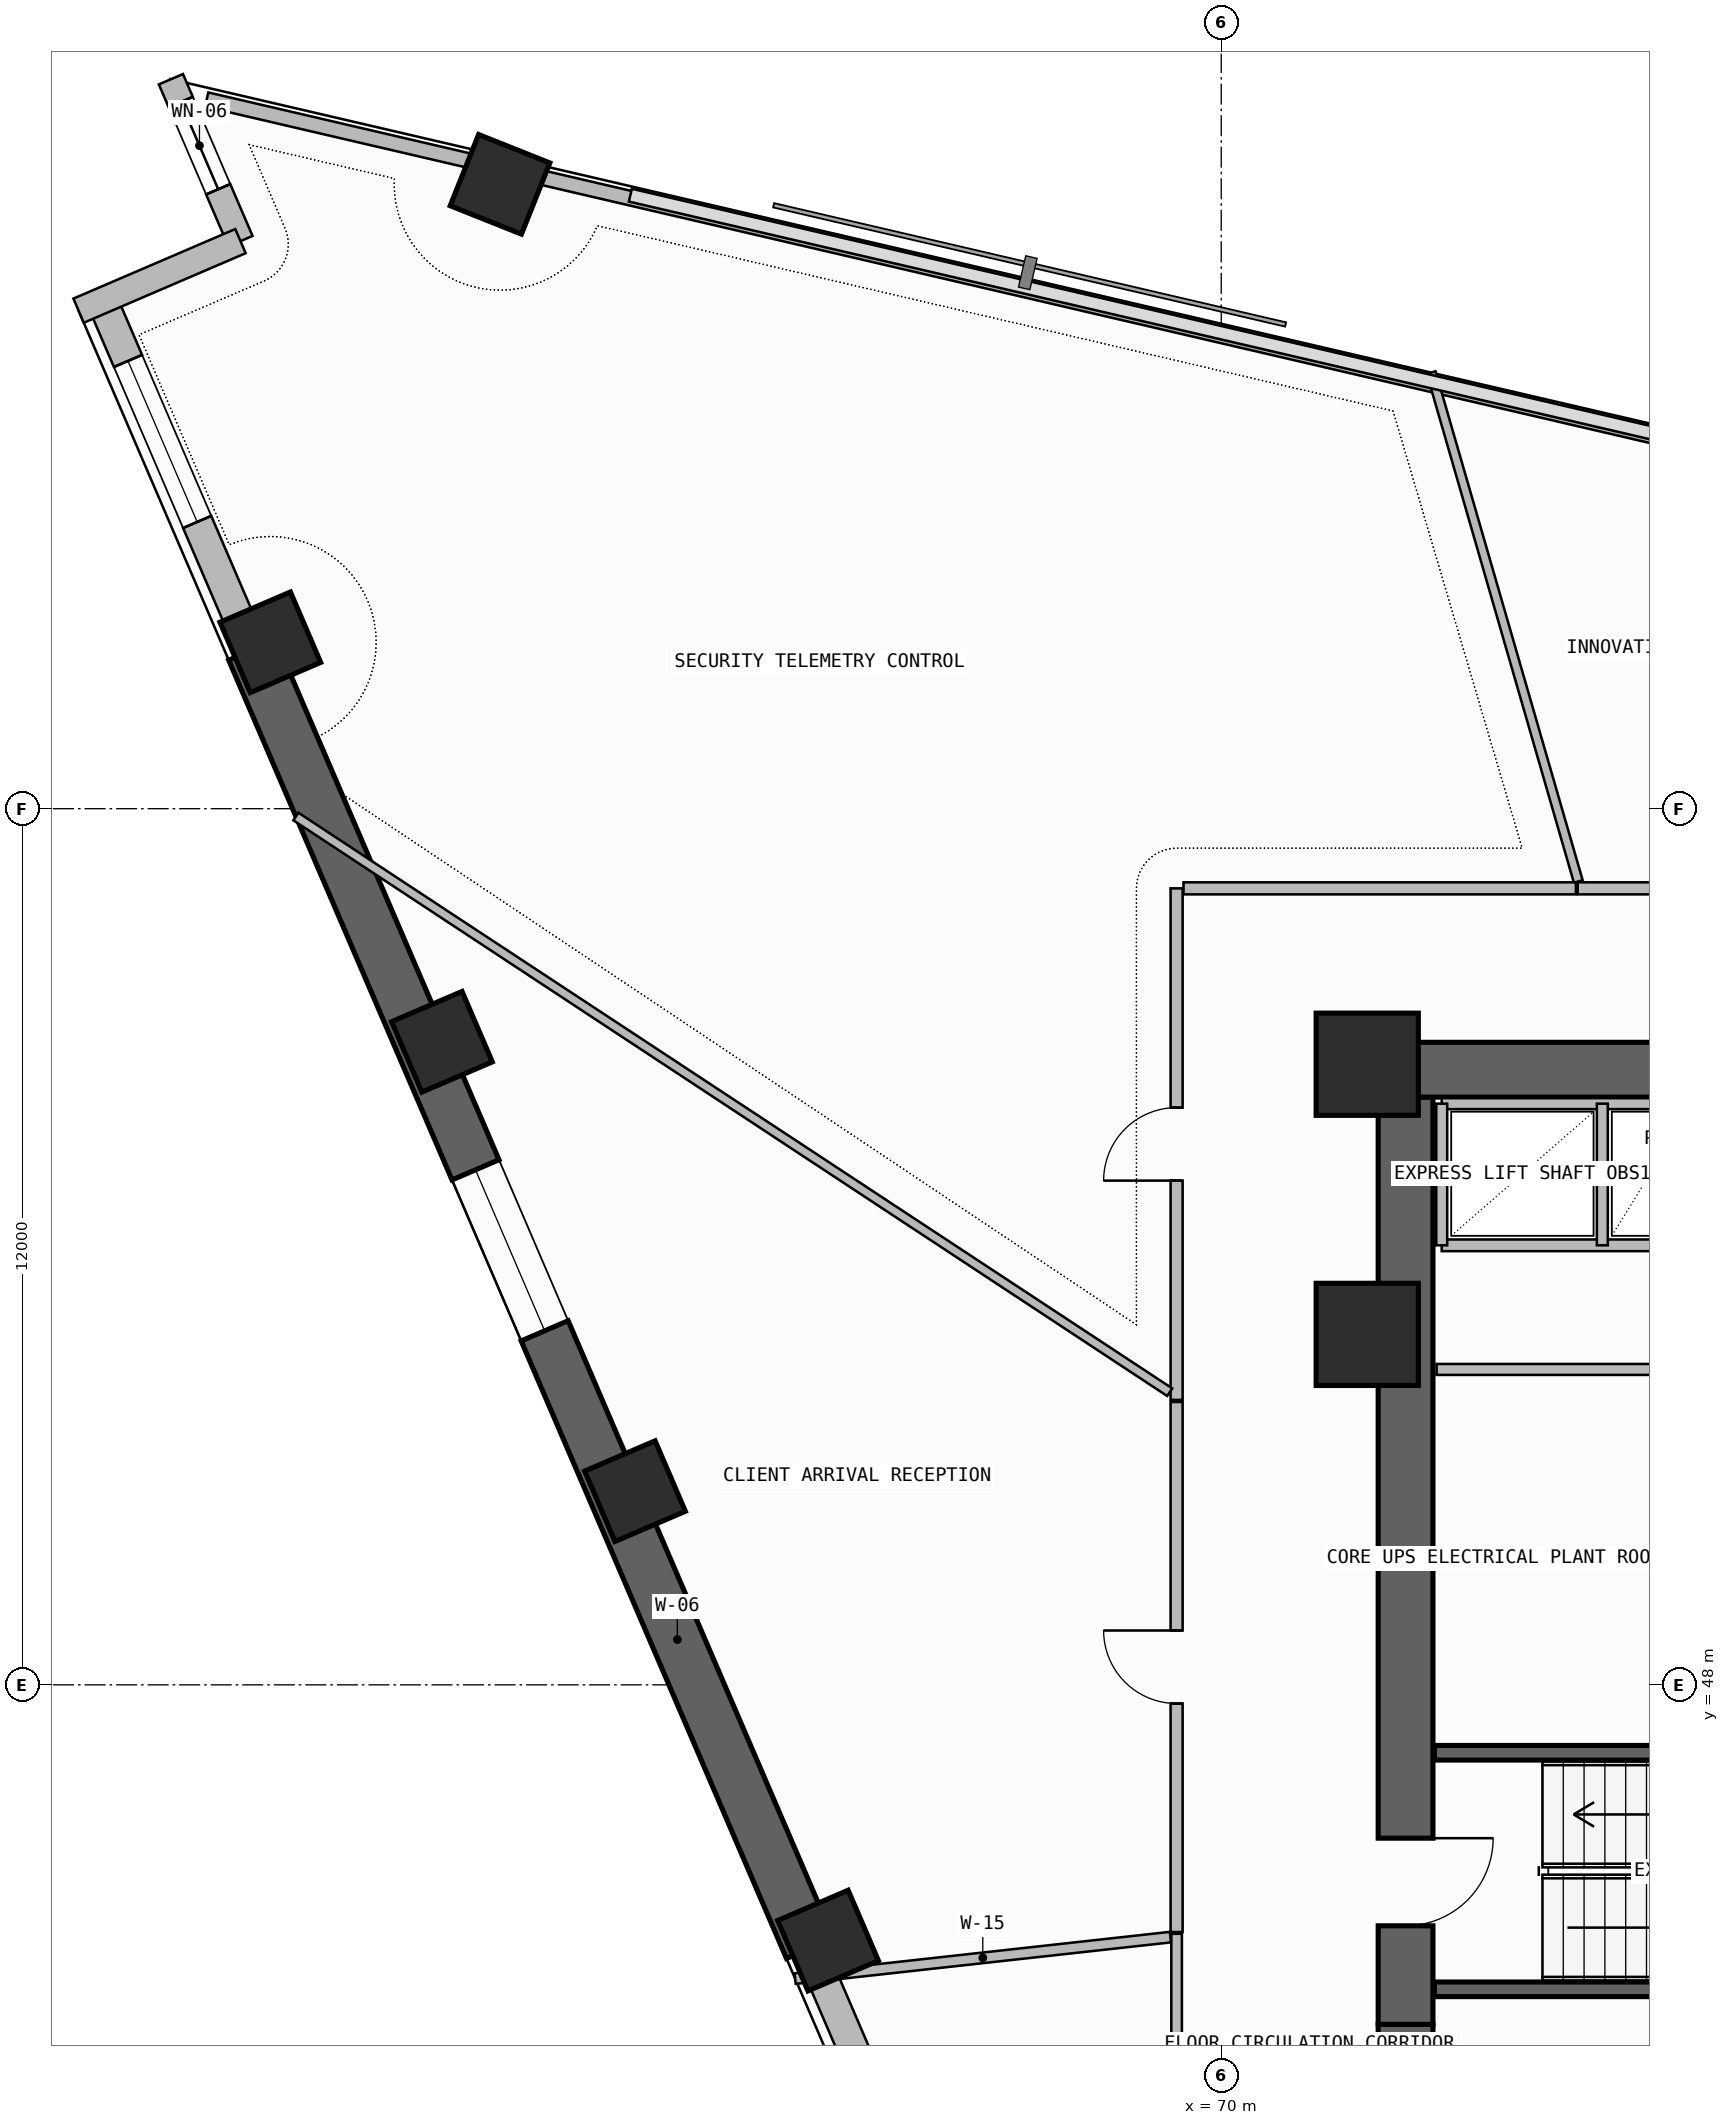
"""IFC4 building model, lengths in metres.
Left out: names, types, materials, properties, quantities, classifications, styles, units other than length and angle.
Written with IfcOpenShell. Run it as: python <this file> out.ifc"""

import sys

from ifc_helpers import new_model, si_unit, direction, frame, frame_2d, origin, origin_2d, place, context, subcontext, project, spatial, rectangle, extrude, element, fill, save


model = new_model("IFC4")
c1 = context("Model", 3, precision=1e-05, world=origin(), true_north=direction((0.0, 1.0)))
c2 = subcontext(c1, "Body", "Model", "MODEL_VIEW")
j1 = project(units=[si_unit("LENGTHUNIT", "METRE"), si_unit("PLANEANGLEUNIT", "RADIAN")], contexts=[c1])
p1 = place(None, origin())
s1 = spatial("IfcSite", under=j1, at=p1, CompositionType="ELEMENT")
p2 = place(p1, origin())
s2 = spatial("IfcBuilding", under=s1, at=p2, CompositionType="ELEMENT")
p3 = place(p2, frame((0.0, 0.0, 171.9)))
s3 = spatial("IfcBuildingStorey", under=s2, at=p3, CompositionType="ELEMENT", Elevation=171.9)
p4 = place(p3, frame((72.525, 35.5, -0.26), z_axis=(0.0, 0.0, 1.0), x_axis=(0.0, 1.0, 0.0)))
e1 = element("IfcWall", 1, at=p4, inside=s3, PredefinedType="SHEAR", context=c2, shape_type="SweptSolid", body=[
    extrude(rectangle(XDim=7.85, YDim=0.75, at=frame_2d((3.925, 0.0))), origin(), (0.0, 0.0, 1.0), 3.6),
])
p5 = place(p4, frame((1.45, 0.0, 0.26)))
e2 = element("IfcOpeningElement", 2, at=p5, cuts=e1, PredefinedType="OPENING", context=c2, shape_type="SweptSolid", body=[
    extrude(rectangle(XDim=1.2, YDim=2.2, at=frame_2d((0.6, 1.1))), frame((0.0, 0.385, 0.0), z_axis=(0.0, -1.0, 0.0), x_axis=(1.0, 0.0, 0.0)), (0.0, 0.0, 1.0), 0.77),
])
p6 = place(p3, frame((72.525, 43.35, -0.26), z_axis=(0.0, 0.0, 1.0), x_axis=(0.0, 1.0, 0.0)))
e3 = element("IfcWall", 3, at=p6, inside=s3, PredefinedType="SHEAR", context=c2, shape_type="SweptSolid", body=[
    extrude(rectangle(XDim=12.7, YDim=0.75, at=frame_2d((6.35, 0.0))), origin(), (0.0, 0.0, 1.0), 3.6),
])
p7 = place(p6, frame((1.35, 0.0, 0.26)))
e4 = element("IfcOpeningElement", 4, at=p7, cuts=e3, PredefinedType="OPENING", context=c2, shape_type="SweptSolid", body=[
    extrude(rectangle(XDim=1.2, YDim=2.2, at=frame_2d((0.6, 1.1))), frame((0.0, 0.385, 0.0), z_axis=(0.0, -1.0, 0.0), x_axis=(1.0, 0.0, 0.0)), (0.0, 0.0, 1.0), 0.77),
])
p8 = place(p3, frame((72.0, 56.425, -0.26), z_axis=(0.0, 0.0, 1.0), x_axis=(1.0, 0.0, 0.0)))
e5 = element("IfcWall", 5, at=p8, inside=s3, PredefinedType="SHEAR", context=c2, shape_type="SweptSolid", body=[
    extrude(rectangle(XDim=13.75, YDim=0.75, at=frame_2d((6.875, 0.0))), origin(), (0.0, 0.0, 1.0), 3.6),
])
for number, where, z_axis, x_axis in (
    (6, (72.0, 52.8, 0.0), (0.0, 0.0, 1.0), (1.0, 0.0, 0.0)),
    (7, (72.0, 56.5, 0.0), (0.0, 0.0, 1.0), (1.0, 0.0, 0.0)),
):
    element("IfcColumn", number, at=place(p3, frame(where, z_axis=z_axis, x_axis=x_axis)), inside=s3, PredefinedType="COLUMN", context=c2, shape_type="SweptSolid", body=[
        extrude(rectangle(XDim=1.4, YDim=1.4, at=origin_2d()), origin(), (0.0, 0.0, 1.0), 3.6),
    ])
for number, where, z_axis, x_axis in (
    (8, (60.122, 68.551, 0.0), (0.0, 0.0, 1.0), (0.371, 0.929, 0.0)),
    (9, (56.976, 62.279, 0.0), (0.0, 0.0, 1.0), (-0.395, 0.919, 0.0)),
    (10, (59.326, 56.807, 0.0), (0.0, 0.0, 1.0), (-0.395, 0.919, 0.0)),
    (11, (61.97, 50.653, 0.0), (0.0, 0.0, 1.0), (-0.395, 0.919, 0.0)),
    (12, (64.615, 44.498, 0.0), (0.0, 0.0, 1.0), (-0.395, 0.919, 0.0)),
):
    element("IfcColumn", number, at=place(p3, frame(where, z_axis=z_axis, x_axis=x_axis)), inside=s3, PredefinedType="COLUMN", context=c2, shape_type="SweptSolid", body=[
        extrude(rectangle(XDim=1.05, YDim=1.05, at=origin_2d()), origin(), (0.0, 0.0, 1.0), 3.6),
    ])
p9 = place(p3, frame((54.671, 66.959, 0.0), z_axis=(0.0, 0.0, 1.0), x_axis=(0.394733507229, -0.918795656428, 0.0)))
e13 = element("IfcWall", 13, at=p9, inside=s3, PredefinedType="SOLIDWALL", context=c2, shape_type="SweptSolid", body=[
    extrude(rectangle(XDim=5.21, YDim=0.42, at=frame_2d((2.605, 0.0))), origin(), (0.0, 0.0, 1.0), 2.725),
])
p10 = place(p9, frame((0.9, 0.0, 1.2)))
e14 = element("IfcOpeningElement", 14, at=p10, cuts=e13, PredefinedType="OPENING", context=c2, shape_type="SweptSolid", body=[
    extrude(rectangle(XDim=2.4, YDim=0.9, at=frame_2d((1.2, 0.45))), frame((0.0, 0.22, 0.0), z_axis=(0.0, -1.0, 0.0), x_axis=(1.0, 0.0, 0.0)), (0.0, 0.0, 1.0), 0.44),
])
p11 = place(p3, frame((56.728, 62.172, -0.26), z_axis=(0.0, 0.0, 1.0), x_axis=(0.394736752992, -0.918794261974, 0.0)))
e15 = element("IfcWall", 15, at=p11, inside=s3, PredefinedType="SHEAR", context=c2, shape_type="SweptSolid", body=[
    extrude(rectangle(XDim=19.353, YDim=0.7, at=frame_2d((9.676, 0.0))), origin(), (0.0, 0.0, 1.0), 3.6),
])
p12 = place(p11, frame((7.747, 0.0, 1.2)))
e16 = element("IfcOpeningElement", 16, at=p12, cuts=e15, PredefinedType="OPENING", context=c2, shape_type="SweptSolid", body=[
    extrude(rectangle(XDim=2.4, YDim=0.9, at=frame_2d((1.2, 0.45))), frame((0.0, 0.36, 0.0), z_axis=(0.0, -1.0, 0.0), x_axis=(1.0, 0.0, 0.0)), (0.0, 0.0, 1.0), 0.72),
])
p13 = place(p3, frame((64.367, 44.391, 0.0), z_axis=(0.0, 0.0, 1.0), x_axis=(0.394757430431, -0.918785378159, 0.0)))
e17 = element("IfcWall", 17, at=p13, inside=s3, PredefinedType="SOLIDWALL", context=c2, shape_type="SweptSolid", body=[
    extrude(rectangle(XDim=12.654, YDim=0.42, at=frame_2d((6.327, 0.0))), origin(), (0.0, 0.0, 1.0), 2.725),
])
p14 = place(p13, frame((3.193, 0.0, 1.2)))
e18 = element("IfcOpeningElement", 18, at=p14, cuts=e17, PredefinedType="OPENING", context=c2, shape_type="SweptSolid", body=[
    extrude(rectangle(XDim=2.4, YDim=0.9, at=frame_2d((1.2, 0.45))), frame((0.0, 0.22, 0.0), z_axis=(0.0, -1.0, 0.0), x_axis=(1.0, 0.0, 0.0)), (0.0, 0.0, 1.0), 0.44),
])
p15 = place(p3, frame((55.614, 69.991, 0.0), z_axis=(0.0, 0.0, 1.0), x_axis=(0.394663989422, -0.918825519592, 0.0)))
e19 = element("IfcWall", 19, at=p15, inside=s3, PredefinedType="SOLIDWALL", context=c2, shape_type="SweptSolid", body=[
    extrude(rectangle(XDim=2.413, YDim=0.36, at=frame_2d((1.207, 0.0))), origin(), (0.0, 0.0, 1.0), 3.34),
])
p16 = place(p15, frame((0.34, 0.0, 0.45)))
e20 = element("IfcOpeningElement", 20, at=p16, cuts=e19, PredefinedType="OPENING", context=c2, shape_type="SweptSolid", body=[
    extrude(rectangle(XDim=1.3, YDim=2.4, at=frame_2d((0.65, 1.2))), frame((0.0, 0.19, 0.0), z_axis=(0.0, -1.0, 0.0), x_axis=(1.0, 0.0, 0.0)), (0.0, 0.0, 1.0), 0.38),
])
p17 = place(p3, frame((56.566, 67.773, 0.0), z_axis=(0.0, 0.0, 1.0), x_axis=(-0.918788830096, -0.394749396062, 0.0)))
e21 = element("IfcWall", 21, at=p17, inside=s3, PredefinedType="SOLIDWALL", context=c2, shape_type="SweptSolid", body=[
    extrude(rectangle(XDim=2.413, YDim=0.36, at=frame_2d((1.207, 0.0))), origin(), (0.0, 0.0, 1.0), 3.34),
])
p18 = place(p3, frame((87.165, 62.482, 0.0), z_axis=(0.0, 0.0, 1.0), x_axis=(-0.973958631559, 0.226725790352, 0.0)))
e22 = element("IfcWall", 22, at=p18, inside=s3, PredefinedType="PARAPET", context=c2, shape_type="SweptSolid", body=[
    extrude(rectangle(XDim=27.376, YDim=0.2, at=frame_2d((13.688, 0.0))), origin(), (0.0, 0.0, 1.0), 1.15),
])
p19 = place(p3, frame((59.841, 68.843, 0.0), z_axis=(0.0, 0.0, 1.0), x_axis=(-0.973951848941, 0.226754924851, 0.0)))
e23 = element("IfcWall", 23, at=p19, inside=s3, PredefinedType="PARAPET", context=c2, shape_type="SweptSolid", body=[
    extrude(rectangle(XDim=3.837, YDim=0.2, at=frame_2d((1.918, 0.0))), origin(), (0.0, 0.0, 1.0), 1.15),
])
for number, where, z_axis, x_axis in (
    (24, (72.92, 43.83, -0.26), (0.0, 0.0, 1.0), (1.0, 0.0, 0.0)),
    (25, (72.92, 47.07, -0.26), (0.0, 0.0, 1.0), (1.0, 0.0, 0.0)),
):
    element("IfcWall", number, at=place(p3, frame(where, z_axis=z_axis, x_axis=x_axis)), inside=s3, PredefinedType="SOLIDWALL", context=c2, shape_type="SweptSolid", body=[
        extrude(rectangle(XDim=7.7, YDim=0.2, at=frame_2d((3.85, 0.0))), origin(), (0.0, 0.0, 1.0), 3.6),
    ])
p20 = place(p3, frame((72.95, 52.32, 0.0), z_axis=(0.0, 0.0, 1.0), x_axis=(1.0, 0.0, 0.0)))
e26 = element("IfcWall", 26, at=p20, inside=s3, PredefinedType="SOLIDWALL", context=c2, shape_type="SweptSolid", body=[
    extrude(rectangle(XDim=3.33, YDim=0.15, at=frame_2d((1.665, 0.0))), origin(), (0.0, 0.0, 1.0), 3.34),
])
p21 = place(p3, frame((73.02, 54.02, 0.0), z_axis=(0.0, 0.0, 1.0), x_axis=(1.0, 0.0, 0.0)))
e27 = element("IfcWall", 27, at=p21, inside=s3, PredefinedType="SOLIDWALL", context=c2, shape_type="SweptSolid", body=[
    extrude(rectangle(XDim=12.08, YDim=0.16, at=frame_2d((6.04, 0.0))), origin(), (0.0, 0.0, 1.0), 3.34),
])
p22 = place(p3, frame((73.02, 55.96, 0.0), z_axis=(0.0, 0.0, 1.0), x_axis=(1.0, 0.0, 0.0)))
e28 = element("IfcWall", 28, at=p22, inside=s3, PredefinedType="SOLIDWALL", context=c2, shape_type="SweptSolid", body=[
    extrude(rectangle(XDim=3.5, YDim=0.15, at=frame_2d((1.75, 0.0))), origin(), (0.0, 0.0, 1.0), 3.34),
])
for number, where, z_axis, x_axis in (
    (29, (73.02, 54.02, 0.0), (0.0, 0.0, 1.0), (0.0, 1.0, 0.0)),
    (30, (75.22, 54.02, 0.0), (0.0, 0.0, 1.0), (0.0, 1.0, 0.0)),
):
    element("IfcWall", number, at=place(p3, frame(where, z_axis=z_axis, x_axis=x_axis)), inside=s3, PredefinedType="PLUMBINGWALL", context=c2, shape_type="SweptSolid", body=[
        extrude(rectangle(XDim=1.94, YDim=0.15, at=frame_2d((0.97, 0.0))), origin(), (0.0, 0.0, 1.0), 3.34),
    ])
p23 = place(p3, frame((69.389, 44.591, 0.0), z_axis=(0.0, 0.0, 1.0), x_axis=(0.0, -1.0, 0.0)))
e31 = element("IfcWall", 31, at=p23, inside=s3, PredefinedType="PARTITIONING", context=c2, shape_type="SweptSolid", body=[
    extrude(rectangle(XDim=8.595, YDim=0.145, at=frame_2d((4.298, 0.0))), origin(), (0.0, 0.0, 1.0), 3.34),
])
p24 = place(p23, frame((2.753, 0.0, 0.0)))
e32 = element("IfcOpeningElement", 32, at=p24, cuts=e31, PredefinedType="OPENING", context=c2, shape_type="SweptSolid", body=[
    extrude(rectangle(XDim=0.9, YDim=2.1, at=frame_2d((0.45, 1.05))), frame((0.0, 0.083, 0.0), z_axis=(0.0, -1.0, 0.0), x_axis=(1.0, 0.0, 0.0)), (0.0, 0.0, 1.0), 0.165),
])
p25 = place(p3, frame((64.164, 43.977, 0.0), z_axis=(0.0, 0.0, 1.0), x_axis=(0.993948043417, 0.109851203849, 0.0)))
e33 = element("IfcWall", 33, at=p25, inside=s3, PredefinedType="PARTITIONING", context=c2, shape_type="SweptSolid", body=[
    extrude(rectangle(XDim=5.172, YDim=0.145, at=frame_2d((2.586, 0.0))), origin(), (0.0, 0.0, 1.0), 3.34),
])
p26 = place(p3, frame((84.532, 58.909, 0.0), z_axis=(0.0, 0.0, 1.0), x_axis=(-1.0, 0.0, 0.0)))
e34 = element("IfcWall", 34, at=p26, inside=s3, PredefinedType="PARTITIONING", context=c2, shape_type="SweptSolid", body=[
    extrude(rectangle(XDim=9.65, YDim=0.165, at=frame_2d((4.825, 0.0))), origin(), (0.0, 0.0, 1.0), 3.34),
])
p27 = place(p26, frame((4.325, 0.0, 0.0)))
e35 = element("IfcOpeningElement", 35, at=p27, cuts=e34, PredefinedType="OPENING", context=c2, shape_type="SweptSolid", body=[
    extrude(rectangle(XDim=1.0, YDim=2.2, at=frame_2d((0.5, 1.1))), frame((0.0, 0.093, 0.0), z_axis=(0.0, -1.0, 0.0), x_axis=(1.0, 0.0, 0.0)), (0.0, 0.0, 1.0), 0.185),
])
p28 = place(p3, frame((74.89, 59.003, 0.0), z_axis=(0.0, 0.0, 1.0), x_axis=(-0.277684607066, 0.960672295322, 0.0)))
e36 = element("IfcWall", 36, at=p28, inside=s3, PredefinedType="PARTITIONING", context=c2, shape_type="SweptSolid", body=[
    extrude(rectangle(XDim=7.254, YDim=0.125, at=frame_2d((3.627, 0.0))), origin(), (0.0, 0.0, 1.0), 3.34),
])
p29 = place(p3, frame((69.389, 58.909, 0.0), z_axis=(0.0, 0.0, 1.0), x_axis=(0.0, -1.0, 0.0)))
e37 = element("IfcWall", 37, at=p29, inside=s3, PredefinedType="PARTITIONING", context=c2, shape_type="SweptSolid", body=[
    extrude(rectangle(XDim=7.006, YDim=0.165, at=frame_2d((3.503, 0.0))), origin(), (0.0, 0.0, 1.0), 2.825),
])
p30 = place(p29, frame((3.003, 0.0, 0.0)))
e38 = element("IfcOpeningElement", 38, at=p30, cuts=e37, PredefinedType="OPENING", context=c2, shape_type="SweptSolid", body=[
    extrude(rectangle(XDim=1.0, YDim=2.2, at=frame_2d((0.5, 1.1))), frame((0.0, 0.093, 0.0), z_axis=(0.0, -1.0, 0.0), x_axis=(1.0, 0.0, 0.0)), (0.0, 0.0, 1.0), 0.185),
])
p31 = place(p3, frame((74.858, 58.909, 0.0), z_axis=(0.0, 0.0, 1.0), x_axis=(-1.0, 0.0, 0.0)))
e39 = element("IfcWall", 39, at=p31, inside=s3, PredefinedType="PARTITIONING", context=c2, shape_type="SweptSolid", body=[
    extrude(rectangle(XDim=5.375, YDim=0.165, at=frame_2d((2.687, 0.0))), origin(), (0.0, 0.0, 1.0), 2.825),
])
p32 = place(p3, frame((69.294, 52.008, 0.0), z_axis=(0.0, 0.0, 1.0), x_axis=(-0.835080394173, 0.550127926276, 0.0)))
e40 = element("IfcWall", 40, at=p32, inside=s3, PredefinedType="PARTITIONING", context=c2, shape_type="SweptSolid", body=[
    extrude(rectangle(XDim=14.332, YDim=0.125, at=frame_2d((7.166, 0.0))), origin(), (0.0, 0.0, 1.0), 2.725),
])
p33 = place(p3, frame((69.389, 51.874, 0.0), z_axis=(0.0, 0.0, 1.0), x_axis=(0.0, -1.0, 0.0)))
e41 = element("IfcWall", 41, at=p33, inside=s3, PredefinedType="PARTITIONING", context=c2, shape_type="SweptSolid", body=[
    extrude(rectangle(XDim=7.26, YDim=0.165, at=frame_2d((3.63, 0.0))), origin(), (0.0, 0.0, 1.0), 2.825),
])
p34 = place(p33, frame((3.13, 0.0, 0.0)))
e42 = element("IfcOpeningElement", 42, at=p34, cuts=e41, PredefinedType="OPENING", context=c2, shape_type="SweptSolid", body=[
    extrude(rectangle(XDim=1.0, YDim=2.2, at=frame_2d((0.5, 1.1))), frame((0.0, 0.093, 0.0), z_axis=(0.0, -1.0, 0.0), x_axis=(1.0, 0.0, 0.0)), (0.0, 0.0, 1.0), 0.185),
])
p35 = place(p10, origin())
e43 = element("IfcWindow", 43, at=p35, inside=s3, PartitioningType="SINGLE_PANEL", PredefinedType="WINDOW", context=c2, shape_type="SweptSolid", body=[
    extrude(rectangle(XDim=2.4, YDim=0.9, at=frame_2d((1.2, 0.45))), frame((0.0, 0.03, 0.0), z_axis=(0.0, -1.0, 0.0), x_axis=(1.0, 0.0, 0.0)), (0.0, 0.0, 1.0), 0.06),
])
fill(e14, e43)
p36 = place(p12, origin())
e44 = element("IfcWindow", 44, at=p36, inside=s3, PartitioningType="SINGLE_PANEL", PredefinedType="WINDOW", context=c2, shape_type="SweptSolid", body=[
    extrude(rectangle(XDim=2.4, YDim=0.9, at=frame_2d((1.2, 0.45))), frame((0.0, 0.03, 0.0), z_axis=(0.0, -1.0, 0.0), x_axis=(1.0, 0.0, 0.0)), (0.0, 0.0, 1.0), 0.06),
])
fill(e16, e44)
p37 = place(p16, origin())
e45 = element("IfcWindow", 45, at=p37, inside=s3, PartitioningType="SINGLE_PANEL", PredefinedType="WINDOW", context=c2, shape_type="SweptSolid", body=[
    extrude(rectangle(XDim=1.3, YDim=2.4, at=frame_2d((0.65, 1.2))), frame((0.0, 0.03, 0.0), z_axis=(0.0, -1.0, 0.0), x_axis=(1.0, 0.0, 0.0)), (0.0, 0.0, 1.0), 0.06),
])
fill(e20, e45)
p38 = place(p7, frame((1.2, 0.0, 0.0), z_axis=(0.0, 0.0, 1.0), x_axis=(-1.0, 0.0, 0.0)))
e46 = element("IfcDoor", 46, at=p38, inside=s3, OperationType="SINGLE_SWING_LEFT", PredefinedType="USERDEFINED", context=c2, shape_type="SweptSolid", body=[
    extrude(rectangle(XDim=1.2, YDim=2.2, at=frame_2d((0.6, 1.1))), frame((0.0, 0.025, 0.0), z_axis=(0.0, -1.0, 0.0), x_axis=(1.0, 0.0, 0.0)), (0.0, 0.0, 1.0), 0.05),
])
fill(e4, e46)
p39 = place(p30, frame((1.0, 0.0, 0.0), z_axis=(0.0, 0.0, 1.0), x_axis=(-1.0, 0.0, 0.0)))
e47 = element("IfcDoor", 47, at=p39, inside=s3, OperationType="SINGLE_SWING_LEFT", PredefinedType="DOOR", context=c2, shape_type="SweptSolid", body=[
    extrude(rectangle(XDim=1.0, YDim=2.2, at=frame_2d((0.5, 1.1))), frame((0.0, 0.025, 0.0), z_axis=(0.0, -1.0, 0.0), x_axis=(1.0, 0.0, 0.0)), (0.0, 0.0, 1.0), 0.05),
])
fill(e38, e47)
p40 = place(p34, frame((1.0, 0.0, 0.0), z_axis=(0.0, 0.0, 1.0), x_axis=(-1.0, 0.0, 0.0)))
e48 = element("IfcDoor", 48, at=p40, inside=s3, OperationType="SINGLE_SWING_RIGHT", PredefinedType="DOOR", context=c2, shape_type="SweptSolid", body=[
    extrude(rectangle(XDim=1.0, YDim=2.2, at=frame_2d((0.5, 1.1))), frame((0.0, 0.025, 0.0), z_axis=(0.0, -1.0, 0.0), x_axis=(1.0, 0.0, 0.0)), (0.0, 0.0, 1.0), 0.05),
])
fill(e42, e48)
save(model, sys.argv[1])
